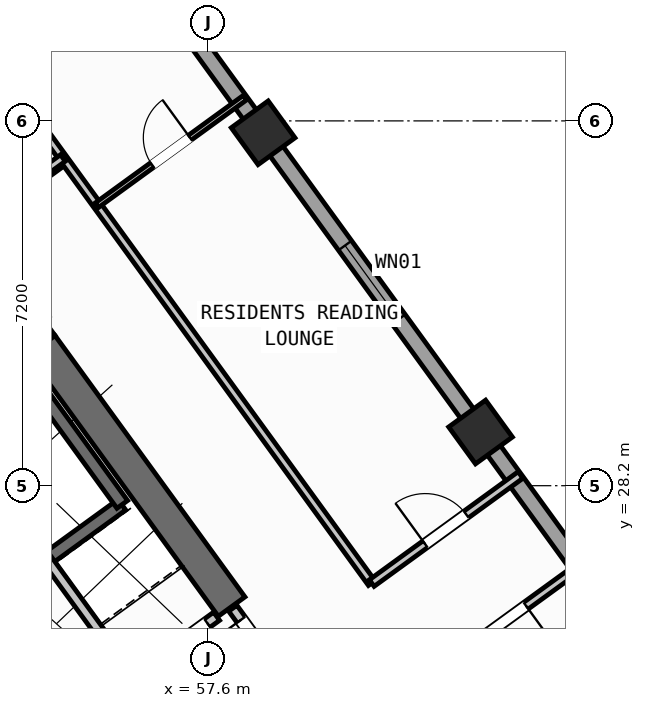
"""IFC4 building model, lengths in metres.
Left out: names, types, materials, properties, quantities, classifications, styles, units other than length and angle.
Written with IfcOpenShell. Run it as: python <this file> out.ifc"""

import sys

from ifc_helpers import new_model, si_unit, direction, frame, frame_2d, origin, origin_2d, place, context, subcontext, project, spatial, rectangle, hollow_rectangle, extrude, source, transform, mapped, element, fill, save


model = new_model("IFC4")
c1 = context("Model", 3, precision=1e-05, world=origin(), true_north=direction((0.0, 1.0)))
c2 = subcontext(c1, "Body", "Model", "MODEL_VIEW")
j1 = project(units=[si_unit("LENGTHUNIT", "METRE"), si_unit("PLANEANGLEUNIT", "RADIAN")], contexts=[c1])
p1 = place(None, origin())
s1 = spatial("IfcSite", under=j1, at=p1, CompositionType="ELEMENT")
p2 = place(p1, origin())
s2 = spatial("IfcBuilding", under=s1, at=p2, CompositionType="ELEMENT")
p3 = place(p2, frame((0.0, 0.0, 93.6)))
s3 = spatial("IfcBuildingStorey", under=s2, at=p3, CompositionType="ELEMENT", Elevation=93.6)
p4 = place(p3, frame((44.325, 24.113, 0.0), z_axis=(0.0, 0.0, 1.0), x_axis=(0.809012664862, 0.58779121131, 0.0)))
e1 = element("IfcWall", 1, at=p4, inside=s3, PredefinedType="SHEAR", context=c2, shape_type="SweptSolid", body=[
    extrude(rectangle(XDim=12.44, YDim=0.65, at=frame_2d((6.22, 0.0))), origin(), (0.0, 0.0, 1.0), 3.35),
])
p5 = place(p3, frame((58.064, 25.813, 0.0), z_axis=(0.0, 0.0, 1.0), x_axis=(-0.58777996584, 0.809020835181, 0.0)))
e2 = element("IfcWall", 2, at=p5, inside=s3, PredefinedType="SHEAR", context=c2, shape_type="SweptSolid", body=[
    extrude(rectangle(XDim=6.375, YDim=0.65, at=frame_2d((3.188, 0.0))), origin(), (0.0, 0.0, 1.0), 3.35),
])
m1 = source(origin(), c2, "Body", "SweptSolid", [
    extrude(hollow_rectangle(XDim=0.9, YDim=0.9, WallThickness=0.036, at=origin_2d()), origin(), (0.0, 0.0, 1.0), 3.6),
])
for number, where, z_axis, x_axis in (
    (3, (62.977, 29.259, 0.0), (0.0, 0.0, 1.0), (0.809, 0.588, 0.0)),
    (4, (58.686, 35.165, 0.0), (0.0, 0.0, 1.0), (0.809, 0.588, 0.0)),
):
    element("IfcColumn", number, at=place(p3, frame(where, z_axis=z_axis, x_axis=x_axis)), inside=s3, PredefinedType="COLUMN", context=c2, shape_type="MappedRepresentation", body=[
        mapped(m1, transform((0.0, 0.0, 0.0), scale=1.0)),
    ])
p6 = place(p3, frame((42.207, 31.597, 0.0), z_axis=(0.0, 0.0, 1.0), x_axis=(0.809020333377, 0.587780656523, 0.0)))
e5 = element("IfcWall", 5, at=p6, inside=s3, PredefinedType="STANDARD", context=c2, shape_type="SweptSolid", body=[
    extrude(rectangle(XDim=15.223, YDim=0.32, at=frame_2d((7.611, 0.0))), origin(), (0.0, 0.0, 1.0), 3.35),
])
p7 = place(p6, frame((12.82, 0.0, 0.0)))
e6 = element("IfcOpeningElement", 6, at=p7, cuts=e5, PredefinedType="OPENING", context=c2, shape_type="SweptSolid", body=[
    extrude(rectangle(XDim=1.05, YDim=2.15, at=frame_2d((0.525, 1.075))), frame((0.0, 0.17, 0.0), z_axis=(0.0, -1.0, 0.0), x_axis=(1.0, 0.0, 0.0)), (0.0, 0.0, 1.0), 0.34),
])
p8 = place(p6, frame((1.52, 0.0, 0.8)))
e7 = element("IfcOpeningElement", 7, at=p8, cuts=e5, PredefinedType="OPENING", context=c2, shape_type="SweptSolid", body=[
    extrude(rectangle(XDim=2.1, YDim=1.55, at=frame_2d((1.05, 0.775))), frame((0.0, 0.17, 0.0), z_axis=(0.0, -1.0, 0.0), x_axis=(1.0, 0.0, 0.0)), (0.0, 0.0, 1.0), 0.34),
])
p9 = place(p6, frame((5.76, 0.0, 0.8)))
e8 = element("IfcOpeningElement", 8, at=p9, cuts=e5, PredefinedType="OPENING", context=c2, shape_type="SweptSolid", body=[
    extrude(rectangle(XDim=2.1, YDim=1.55, at=frame_2d((1.05, 0.775))), frame((0.0, 0.17, 0.0), z_axis=(0.0, -1.0, 0.0), x_axis=(1.0, 0.0, 0.0)), (0.0, 0.0, 1.0), 0.34),
])
p10 = place(p6, frame((10.219, 0.0, 1.0)))
e9 = element("IfcOpeningElement", 9, at=p10, cuts=e5, PredefinedType="OPENING", context=c2, shape_type="SweptSolid", body=[
    extrude(rectangle(XDim=0.9, YDim=1.25, at=frame_2d((0.45, 0.625))), frame((0.0, 0.17, 0.0), z_axis=(0.0, -1.0, 0.0), x_axis=(1.0, 0.0, 0.0)), (0.0, 0.0, 1.0), 0.34),
])
p11 = place(p3, frame((54.81, 40.5, 0.0), z_axis=(0.0, 0.0, 1.0), x_axis=(0.587783625747, -0.809018176127, 0.0)))
e10 = element("IfcWall", 10, at=p11, inside=s3, PredefinedType="STANDARD", context=c2, shape_type="SweptSolid", body=[
    extrude(rectangle(XDim=21.587, YDim=0.32, at=frame_2d((10.794, 0.0))), origin(), (0.0, 0.0, 1.0), 2.775),
])
p12 = place(p11, frame((2.143, 0.0, 0.8)))
e11 = element("IfcOpeningElement", 11, at=p12, cuts=e10, PredefinedType="OPENING", context=c2, shape_type="SweptSolid", body=[
    extrude(rectangle(XDim=2.1, YDim=1.55, at=frame_2d((1.05, 0.775))), frame((0.0, 0.17, 0.0), z_axis=(0.0, -1.0, 0.0), x_axis=(1.0, 0.0, 0.0)), (0.0, 0.0, 1.0), 0.34),
])
p13 = place(p11, frame((9.344, 0.0, 0.85)))
e12 = element("IfcOpeningElement", 12, at=p13, cuts=e10, PredefinedType="OPENING", context=c2, shape_type="SweptSolid", body=[
    extrude(rectangle(XDim=1.8, YDim=1.5, at=frame_2d((0.9, 0.75))), frame((0.0, 0.17, 0.0), z_axis=(0.0, -1.0, 0.0), x_axis=(1.0, 0.0, 0.0)), (0.0, 0.0, 1.0), 0.34),
])
p14 = place(p11, frame((18.309, 0.0, 0.85)))
e13 = element("IfcOpeningElement", 13, at=p14, cuts=e10, PredefinedType="OPENING", context=c2, shape_type="SweptSolid", body=[
    extrude(rectangle(XDim=1.5, YDim=1.5, at=frame_2d((0.75, 0.75))), frame((0.0, 0.17, 0.0), z_axis=(0.0, -1.0, 0.0), x_axis=(1.0, 0.0, 0.0)), (0.0, 0.0, 1.0), 0.34),
])
p15 = place(p3, frame((49.863, 23.44, 0.0), z_axis=(0.0, 0.0, 1.0), x_axis=(0.809003474932, 0.587803859759, 0.0)))
e14 = element("IfcWall", 14, at=p15, inside=s3, PredefinedType="SHEAR", context=c2, shape_type="SweptSolid", body=[
    extrude(rectangle(XDim=7.46, YDim=0.26, at=frame_2d((3.73, 0.0))), origin(), (0.0, 0.0, 1.0), 3.35),
])
p16 = place(p15, frame((0.36, 0.0, 0.0)))
e15 = element("IfcOpeningElement", 15, at=p16, cuts=e14, PredefinedType="OPENING", context=c2, shape_type="SweptSolid", body=[
    extrude(rectangle(XDim=0.86, YDim=2.05, at=frame_2d((0.43, 1.025))), frame((0.0, 0.14, 0.0), z_axis=(0.0, -1.0, 0.0), x_axis=(1.0, 0.0, 0.0)), (0.0, 0.0, 1.0), 0.28),
])
p17 = place(p3, frame((55.906, 27.831, 0.0), z_axis=(0.0, 0.0, 1.0), x_axis=(-0.587804123638, 0.809003283204, 0.0)))
e16 = element("IfcWall", 16, at=p17, inside=s3, PredefinedType="SHEAR", context=c2, shape_type="SweptSolid", body=[
    extrude(rectangle(XDim=3.16, YDim=0.26, at=frame_2d((1.58, 0.0))), origin(), (0.0, 0.0, 1.0), 3.35),
])
p18 = place(p3, frame((56.111, 24.419, 0.0), z_axis=(0.0, 0.0, 1.0), x_axis=(-0.58777848983, 0.809021907548, 0.0)))
e17 = element("IfcWall", 17, at=p18, inside=s3, PredefinedType="STANDARD", context=c2, shape_type="SweptSolid", body=[
    extrude(rectangle(XDim=2.88, YDim=0.2, at=frame_2d((1.44, 0.0))), origin(), (0.0, 0.0, 1.0), 3.34),
])
p19 = place(p3, frame((53.425, 22.468, 0.0), z_axis=(0.0, 0.0, 1.0), x_axis=(0.80902705128, 0.587771409902, 0.0)))
e18 = element("IfcWall", 18, at=p19, inside=s3, PredefinedType="STANDARD", context=c2, shape_type="SweptSolid", body=[
    extrude(rectangle(XDim=5.368, YDim=0.2, at=frame_2d((2.684, 0.0))), origin(), (0.0, 0.0, 1.0), 3.34),
])
p20 = place(p19, frame((4.28, 0.0, 0.0)))
e19 = element("IfcOpeningElement", 19, at=p20, cuts=e18, PredefinedType="OPENING", context=c2, shape_type="SweptSolid", body=[
    extrude(rectangle(XDim=0.86, YDim=2.05, at=frame_2d((0.43, 1.025))), frame((0.0, 0.11, 0.0), z_axis=(0.0, -1.0, 0.0), x_axis=(1.0, 0.0, 0.0)), (0.0, 0.0, 1.0), 0.22),
])
p21 = place(p19, frame((1.45, 0.0, 0.0)))
e20 = element("IfcOpeningElement", 20, at=p21, cuts=e18, PredefinedType="OPENING", context=c2, shape_type="SweptSolid", body=[
    extrude(rectangle(XDim=0.86, YDim=2.05, at=frame_2d((0.43, 1.025))), frame((0.0, 0.11, 0.0), z_axis=(0.0, -1.0, 0.0), x_axis=(1.0, 0.0, 0.0)), (0.0, 0.0, 1.0), 0.22),
])
p22 = place(p3, frame((59.827, 23.386, 0.0), z_axis=(0.0, 0.0, 1.0), x_axis=(-0.587803840107, 0.809003489211, 0.0)))
e21 = element("IfcWall", 21, at=p22, inside=s3, PredefinedType="STANDARD", context=c2, shape_type="SweptSolid", body=[
    extrude(rectangle(XDim=2.96, YDim=0.2, at=frame_2d((1.48, 0.0))), origin(), (0.0, 0.0, 1.0), 3.34),
])
p23 = place(p22, frame((1.68, 0.0, 0.0)))
e22 = element("IfcOpeningElement", 22, at=p23, cuts=e21, PredefinedType="OPENING", context=c2, shape_type="SweptSolid", body=[
    extrude(rectangle(XDim=1.0, YDim=2.1, at=frame_2d((0.5, 1.05))), frame((0.0, 0.11, 0.0), z_axis=(0.0, -1.0, 0.0), x_axis=(1.0, 0.0, 0.0)), (0.0, 0.0, 1.0), 0.22),
])
p24 = place(p3, frame((52.739, 33.143, 0.0), z_axis=(0.0, 0.0, 1.0), x_axis=(0.809000999347, 0.58780726693, 0.0)))
e23 = element("IfcWall", 23, at=p24, inside=s3, PredefinedType="PARTITIONING", context=c2, shape_type="SweptSolid", body=[
    extrude(rectangle(XDim=2.51, YDim=0.16, at=frame_2d((1.255, 0.0))), origin(), (0.0, 0.0, 1.0), 3.34),
])
p25 = place(p3, frame((60.829, 26.278, 0.0), z_axis=(0.0, 0.0, 1.0), x_axis=(-0.587777474174, 0.809022645451, 0.0)))
e24 = element("IfcWall", 24, at=p25, inside=s3, PredefinedType="PARTITIONING", context=c2, shape_type="SweptSolid", body=[
    extrude(rectangle(XDim=15.1, YDim=0.16, at=frame_2d((7.55, 0.0))), origin(), (0.0, 0.0, 1.0), 3.34),
])
p26 = place(p3, frame((62.093, 24.538, 0.0), z_axis=(0.0, 0.0, 1.0), x_axis=(0.809035546126, 0.58775971715, 0.0)))
e25 = element("IfcWall", 25, at=p26, inside=s3, PredefinedType="PARTITIONING", context=c2, shape_type="SweptSolid", body=[
    extrude(rectangle(XDim=3.63, YDim=0.16, at=frame_2d((1.815, 0.0))), origin(), (0.0, 0.0, 1.0), 3.34),
])
p27 = place(p26, frame((1.2, 0.0, 0.0)))
e26 = element("IfcOpeningElement", 26, at=p27, cuts=e25, PredefinedType="OPENING", context=c2, shape_type="SweptSolid", body=[
    extrude(rectangle(XDim=1.0, YDim=2.1, at=frame_2d((0.5, 1.05))), frame((0.0, 0.09, 0.0), z_axis=(0.0, -1.0, 0.0), x_axis=(1.0, 0.0, 0.0)), (0.0, 0.0, 1.0), 0.18),
])
p28 = place(p3, frame((60.829, 26.278, 0.0), z_axis=(0.0, 0.0, 1.0), x_axis=(0.809003564202, 0.587803736896, 0.0)))
e27 = element("IfcWall", 27, at=p28, inside=s3, PredefinedType="PARTITIONING", context=c2, shape_type="SweptSolid", body=[
    extrude(rectangle(XDim=3.63, YDim=0.16, at=frame_2d((1.815, 0.0))), origin(), (0.0, 0.0, 1.0), 3.34),
])
p29 = place(p28, frame((1.305, 0.0, 0.0)))
e28 = element("IfcOpeningElement", 28, at=p29, cuts=e27, PredefinedType="OPENING", context=c2, shape_type="SweptSolid", body=[
    extrude(rectangle(XDim=1.0, YDim=2.1, at=frame_2d((0.5, 1.05))), frame((0.0, 0.09, 0.0), z_axis=(0.0, -1.0, 0.0), x_axis=(1.0, 0.0, 0.0)), (0.0, 0.0, 1.0), 0.18),
])
p30 = place(p3, frame((55.409, 33.738, 0.0), z_axis=(0.0, 0.0, 1.0), x_axis=(0.809005039917, 0.58780170584, 0.0)))
e29 = element("IfcWall", 29, at=p30, inside=s3, PredefinedType="PARTITIONING", context=c2, shape_type="SweptSolid", body=[
    extrude(rectangle(XDim=3.61, YDim=0.11, at=frame_2d((1.805, 0.0))), origin(), (0.0, 0.0, 1.0), 3.34),
])
p31 = place(p30, frame((1.345, 0.0, 0.0)))
e30 = element("IfcOpeningElement", 30, at=p31, cuts=e29, PredefinedType="OPENING", context=c2, shape_type="SweptSolid", body=[
    extrude(rectangle(XDim=0.92, YDim=2.08, at=frame_2d((0.46, 1.04))), frame((0.0, 0.065, 0.0), z_axis=(0.0, -1.0, 0.0), x_axis=(1.0, 0.0, 0.0)), (0.0, 0.0, 1.0), 0.13),
])
p32 = place(p3, frame((42.866, 26.044, 0.0), z_axis=(0.0, 0.0, 1.0), x_axis=(0.809020254154, 0.587780765566, 0.0)))
e31 = element("IfcWall", 31, at=p32, inside=s3, PredefinedType="PARTITIONING", context=c2, shape_type="SweptSolid", body=[
    extrude(rectangle(XDim=14.67, YDim=0.16, at=frame_2d((7.335, 0.0))), origin(), (0.0, 0.0, 1.0), 3.34),
])
p33 = place(p32, frame((10.2, 0.0, 0.0)))
e32 = element("IfcOpeningElement", 32, at=p33, cuts=e31, PredefinedType="OPENING", context=c2, shape_type="SweptSolid", body=[
    extrude(rectangle(XDim=1.0, YDim=2.1, at=frame_2d((0.5, 1.05))), frame((0.0, 0.09, 0.0), z_axis=(0.0, -1.0, 0.0), x_axis=(1.0, 0.0, 0.0)), (0.0, 0.0, 1.0), 0.18),
])
m2 = source(origin(), c2, "Body", "SweptSolid", [
    extrude(rectangle(XDim=1.8, YDim=1.5, at=frame_2d((0.9, 0.75))), frame((0.0, 0.03, 0.0), z_axis=(0.0, -1.0, 0.0), x_axis=(1.0, 0.0, 0.0)), (0.0, 0.0, 1.0), 0.06),
])
p34 = place(p13, origin())
e33 = element("IfcWindow", 33, at=p34, inside=s3, PartitioningType="SINGLE_PANEL", PredefinedType="WINDOW", context=c2, shape_type="MappedRepresentation", body=[
    mapped(m2, transform((0.0, 0.0, 0.0), scale=1.0)),
])
fill(e12, e33)
m3 = source(origin(), c2, "Body", "SweptSolid", [
    extrude(rectangle(XDim=0.86, YDim=2.05, at=frame_2d((0.43, 1.025))), frame((0.0, 0.025, 0.0), z_axis=(0.0, -1.0, 0.0), x_axis=(1.0, 0.0, 0.0)), (0.0, 0.0, 1.0), 0.05),
])
p35 = place(p20, frame((0.86, 0.0, 0.0), z_axis=(0.0, 0.0, 1.0), x_axis=(-1.0, 0.0, 0.0)))
e34 = element("IfcDoor", 34, at=p35, inside=s3, OperationType="SINGLE_SWING_LEFT", PredefinedType="DOOR", context=c2, shape_type="MappedRepresentation", body=[
    mapped(m3, transform((0.0, 0.0, 0.0), scale=1.0)),
])
fill(e19, e34)
m4 = source(origin(), c2, "Body", "SweptSolid", [
    extrude(rectangle(XDim=1.0, YDim=2.1, at=frame_2d((0.5, 1.05))), frame((0.0, 0.025, 0.0), z_axis=(0.0, -1.0, 0.0), x_axis=(1.0, 0.0, 0.0)), (0.0, 0.0, 1.0), 0.05),
])
p36 = place(p23, origin())
e35 = element("IfcDoor", 35, at=p36, inside=s3, OperationType="SINGLE_SWING_RIGHT", PredefinedType="DOOR", context=c2, shape_type="MappedRepresentation", body=[
    mapped(m4, transform((0.0, 0.0, 0.0), scale=1.0)),
])
fill(e22, e35)
p37 = place(p29, origin())
e36 = element("IfcDoor", 36, at=p37, inside=s3, OperationType="SINGLE_SWING_LEFT", PredefinedType="DOOR", context=c2, shape_type="MappedRepresentation", body=[
    mapped(m4, transform((0.0, 0.0, 0.0), scale=1.0)),
])
fill(e28, e36)
m5 = source(origin(), c2, "Body", "SweptSolid", [
    extrude(rectangle(XDim=0.92, YDim=2.08, at=frame_2d((0.46, 1.04))), frame((0.0, 0.025, 0.0), z_axis=(0.0, -1.0, 0.0), x_axis=(1.0, 0.0, 0.0)), (0.0, 0.0, 1.0), 0.05),
])
p38 = place(p31, origin())
e37 = element("IfcDoor", 37, at=p38, inside=s3, OperationType="SINGLE_SWING_RIGHT", PredefinedType="DOOR", context=c2, shape_type="MappedRepresentation", body=[
    mapped(m5, transform((0.0, 0.0, 0.0), scale=1.0)),
])
fill(e30, e37)
p39 = place(p27, frame((1.0, 0.0, 0.0), z_axis=(0.0, 0.0, 1.0), x_axis=(-1.0, 0.0, 0.0)))
e38 = element("IfcDoor", 38, at=p39, inside=s3, OperationType="SINGLE_SWING_LEFT", PredefinedType="DOOR", context=c2, shape_type="MappedRepresentation", body=[
    mapped(m4, transform((0.0, 0.0, 0.0), scale=1.0)),
])
fill(e26, e38)
save(model, sys.argv[1])
